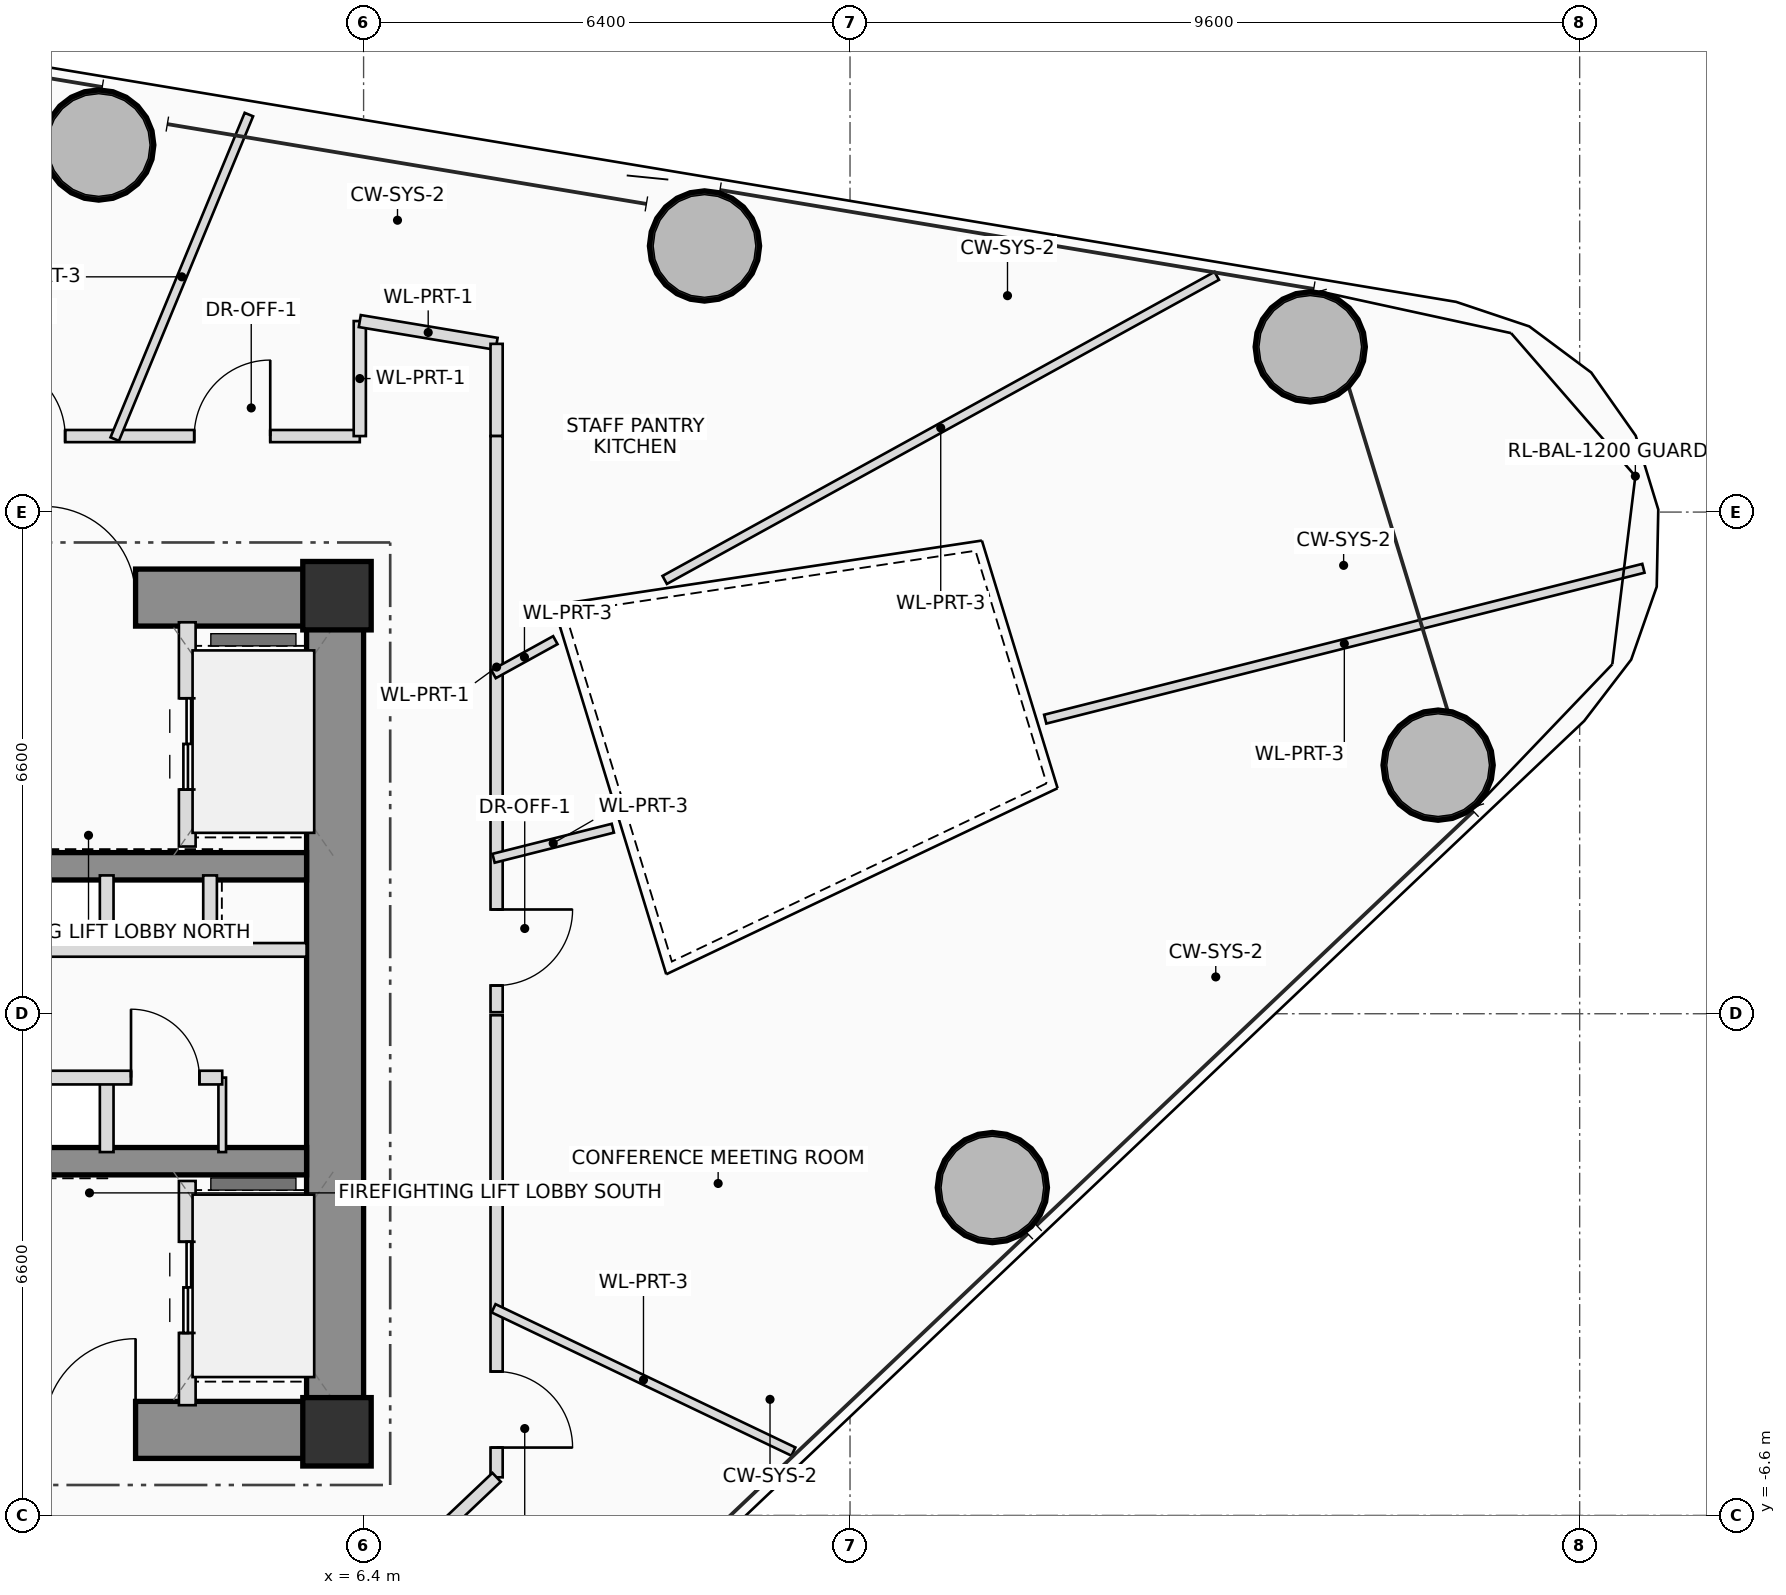
"""IFC4 building model, lengths in metres.
Left out: names, types, materials, properties, quantities, classifications, styles, units other than length and angle.
Written with IfcOpenShell. Run it as: python <this file> out.ifc"""

import sys

from ifc_helpers import new_model, si_unit, direction, frame, frame_2d, origin, origin_2d, place, context, subcontext, project, spatial, rectangle, hollow_circle, extrude, source, transform, mapped, element, fill, save


model = new_model("IFC4")
c1 = context("Model", 3, precision=1e-05, world=origin(), true_north=direction((0.0, 1.0)))
c2 = subcontext(c1, "Body", "Model", "MODEL_VIEW")
j1 = project(units=[si_unit("LENGTHUNIT", "METRE"), si_unit("PLANEANGLEUNIT", "RADIAN")], contexts=[c1])
p1 = place(None, origin())
s1 = spatial("IfcSite", under=j1, at=p1, CompositionType="ELEMENT")
p2 = place(p1, origin())
s2 = spatial("IfcBuilding", under=s1, at=p2, CompositionType="ELEMENT")
p3 = place(p2, frame((0.0, 0.0, 116.15)))
s3 = spatial("IfcBuildingStorey", under=s2, at=p3, CompositionType="ELEMENT", Elevation=116.15)
m1 = source(origin(), c2, "Body", "SweptSolid", [
    extrude(rectangle(XDim=0.9, YDim=0.9, at=origin_2d()), origin(), (0.0, 0.0, 1.0), 3.75),
])
for number, where, z_axis, x_axis in (
    (1, (6.05, -5.5, 0.0), (0.0, 0.0, 1.0), (1.0, 0.0, 0.0)),
    (2, (6.05, 5.5, 0.0), (0.0, 0.0, 1.0), (1.0, 0.0, 0.0)),
):
    element("IfcColumn", number, at=place(p3, frame(where, z_axis=z_axis, x_axis=x_axis)), inside=s3, PredefinedType="COLUMN", context=c2, shape_type="MappedRepresentation", body=[
        mapped(m1, transform((0.0, 0.0, 0.0), scale=1.0)),
    ])
p4 = place(p3, frame((-6.4, 5.475, 0.0), z_axis=(0.0, 0.0, 1.0), x_axis=(1.0, 0.0, 0.0)))
e3 = element("IfcWall", 3, at=p4, inside=s3, PredefinedType="SHEAR", context=c2, shape_type="SweptSolid", body=[
    extrude(rectangle(XDim=12.8, YDim=0.75, at=frame_2d((6.4, 0.0))), origin(), (0.0, 0.0, 1.0), 3.75),
])
p5 = place(p4, frame((8.6, 0.0, 0.0)))
e4 = element("IfcOpeningElement", 4, at=p5, cuts=e3, PredefinedType="OPENING", context=c2, shape_type="SweptSolid", body=[
    extrude(rectangle(XDim=1.2, YDim=2.2, at=frame_2d((0.6, 1.1))), frame((0.0, 0.385, 0.0), z_axis=(0.0, -1.0, 0.0), x_axis=(1.0, 0.0, 0.0)), (0.0, 0.0, 1.0), 0.77),
])
p6 = place(p3, frame((-6.4, -5.475, 0.0), z_axis=(0.0, 0.0, 1.0), x_axis=(1.0, 0.0, 0.0)))
e5 = element("IfcWall", 5, at=p6, inside=s3, PredefinedType="SHEAR", context=c2, shape_type="SweptSolid", body=[
    extrude(rectangle(XDim=12.8, YDim=0.75, at=frame_2d((6.4, 0.0))), origin(), (0.0, 0.0, 1.0), 3.75),
])
p7 = place(p6, frame((8.6, 0.0, 0.0)))
e6 = element("IfcOpeningElement", 6, at=p7, cuts=e5, PredefinedType="OPENING", context=c2, shape_type="SweptSolid", body=[
    extrude(rectangle(XDim=1.2, YDim=2.2, at=frame_2d((0.6, 1.1))), frame((0.0, 0.385, 0.0), z_axis=(0.0, -1.0, 0.0), x_axis=(1.0, 0.0, 0.0)), (0.0, 0.0, 1.0), 0.77),
])
p8 = place(p3, frame((6.025, -5.1, 0.0), z_axis=(0.0, 0.0, 1.0), x_axis=(0.0, 1.0, 0.0)))
e7 = element("IfcWall", 7, at=p8, inside=s3, PredefinedType="SHEAR", context=c2, shape_type="SweptSolid", body=[
    extrude(rectangle(XDim=10.2, YDim=0.75, at=frame_2d((5.1, 0.0))), origin(), (0.0, 0.0, 1.0), 3.75),
])
for number, where, z_axis, x_axis in (
    (8, (-5.65, 1.94, 0.0), (0.0, 0.0, 1.0), (1.0, 0.0, 0.0)),
    (9, (-5.65, -1.94, 0.0), (0.0, 0.0, 1.0), (1.0, 0.0, 0.0)),
):
    element("IfcWall", number, at=place(p3, frame(where, z_axis=z_axis, x_axis=x_axis)), inside=s3, PredefinedType="SHEAR", context=c2, shape_type="SweptSolid", body=[
        extrude(rectangle(XDim=11.3, YDim=0.36, at=frame_2d((5.65, 0.0))), origin(), (0.0, 0.0, 1.0), 3.75),
    ])
m2 = source(origin(), c2, "Body", "SweptSolid", [
    extrude(hollow_circle(Radius=0.725, WallThickness=0.05, at=origin_2d()), origin(), (0.0, 0.0, 1.0), 3.75),
])
for number, where, z_axis, x_axis in (
    (10, (14.673, -2.287, 0.0), (0.0, 0.0, 1.0), (1.0, 0.0, 0.0)),
    (11, (20.538, 3.271, 0.0), (0.0, 0.0, 1.0), (1.0, 0.0, 0.0)),
    (12, (18.855, 8.773, 0.0), (0.0, 0.0, 1.0), (1.0, 0.0, 0.0)),
    (13, (10.885, 10.101, 0.0), (0.0, 0.0, 1.0), (1.0, 0.0, 0.0)),
    (14, (2.915, 11.429, 0.0), (0.0, 0.0, 1.0), (1.0, 0.0, 0.0)),
):
    element("IfcColumn", number, at=place(p3, frame(where, z_axis=z_axis, x_axis=x_axis)), inside=s3, PredefinedType="COLUMN", context=c2, shape_type="MappedRepresentation", body=[
        mapped(m2, transform((0.0, 0.0, 0.0), scale=1.0)),
    ])
p9 = place(p3, frame((4.08, 2.2, 0.0), z_axis=(0.0, 0.0, 1.0), x_axis=(0.0, 1.0, 0.0)))
e15 = element("IfcWall", 15, at=p9, inside=s3, PredefinedType="PLUMBINGWALL", context=c2, shape_type="SweptSolid", body=[
    extrude(rectangle(XDim=2.95, YDim=0.22, at=frame_2d((1.475, 0.0))), origin(), (0.0, 0.0, 1.0), 3.51),
])
p10 = place(p9, frame((0.75, 0.0, 0.0)))
e16 = element("IfcOpeningElement", 16, at=p10, cuts=e15, PredefinedType="OPENING", context=c2, shape_type="SweptSolid", body=[
    extrude(rectangle(XDim=1.2, YDim=2.25, at=frame_2d((0.6, 1.125))), frame((0.0, 0.12, 0.0), z_axis=(0.0, -1.0, 0.0), x_axis=(1.0, 0.0, 0.0)), (0.0, 0.0, 1.0), 0.24),
])
p11 = place(p3, frame((4.08, -5.15, 0.0), z_axis=(0.0, 0.0, 1.0), x_axis=(0.0, 1.0, 0.0)))
e17 = element("IfcWall", 17, at=p11, inside=s3, PredefinedType="PLUMBINGWALL", context=c2, shape_type="SweptSolid", body=[
    extrude(rectangle(XDim=2.95, YDim=0.22, at=frame_2d((1.475, 0.0))), origin(), (0.0, 0.0, 1.0), 3.51),
])
p12 = place(p11, frame((0.95, 0.0, 0.0)))
e18 = element("IfcOpeningElement", 18, at=p12, cuts=e17, PredefinedType="OPENING", context=c2, shape_type="SweptSolid", body=[
    extrude(rectangle(XDim=1.2, YDim=2.25, at=frame_2d((0.6, 1.125))), frame((0.0, 0.12, 0.0), z_axis=(0.0, -1.0, 0.0), x_axis=(1.0, 0.0, 0.0)), (0.0, 0.0, 1.0), 0.24),
])
for number, where, z_axis, x_axis in (
    (19, (3.02, 0.84, 0.0), (0.0, 0.0, 1.0), (0.0, 1.0, 0.0)),
    (20, (4.38, 0.84, 0.0), (0.0, 0.0, 1.0), (0.0, 1.0, 0.0)),
    (21, (3.02, -1.82, 0.0), (0.0, 0.0, 1.0), (0.0, 1.0, 0.0)),
):
    element("IfcWall", number, at=place(p3, frame(where, z_axis=z_axis, x_axis=x_axis)), inside=s3, PredefinedType="PLUMBINGWALL", context=c2, shape_type="SweptSolid", body=[
        extrude(rectangle(XDim=0.98, YDim=0.18, at=frame_2d((0.49, 0.0))), origin(), (0.0, 0.0, 1.0), 3.51),
    ])
p13 = place(p3, frame((4.54, -1.82, 0.0), z_axis=(0.0, 0.0, 1.0), x_axis=(0.0, 1.0, 0.0)))
e22 = element("IfcWall", 22, at=p13, inside=s3, PredefinedType="PARTITIONING", context=c2, shape_type="SweptSolid", body=[
    extrude(rectangle(XDim=0.98, YDim=0.1, at=frame_2d((0.49, 0.0))), origin(), (0.0, 0.0, 1.0), 3.51),
])
p14 = place(p3, frame((-5.68, 0.84, 0.0), z_axis=(0.0, 0.0, 1.0), x_axis=(1.0, 0.0, 0.0)))
e23 = element("IfcWall", 23, at=p14, inside=s3, PredefinedType="PLUMBINGWALL", context=c2, shape_type="SweptSolid", body=[
    extrude(rectangle(XDim=11.33, YDim=0.18, at=frame_2d((5.665, 0.0))), origin(), (0.0, 0.0, 1.0), 3.51),
])
p15 = place(p14, frame((0.43, 0.0, 0.0)))
e24 = element("IfcOpeningElement", 24, at=p15, cuts=e23, PredefinedType="OPENING", context=c2, shape_type="SweptSolid", body=[
    extrude(rectangle(XDim=1.1, YDim=2.2, at=frame_2d((0.55, 1.1))), frame((0.0, 0.1, 0.0), z_axis=(0.0, -1.0, 0.0), x_axis=(1.0, 0.0, 0.0)), (0.0, 0.0, 1.0), 0.2),
])
p16 = place(p14, frame((2.13, 0.0, 0.0)))
e25 = element("IfcOpeningElement", 25, at=p16, cuts=e23, PredefinedType="OPENING", context=c2, shape_type="SweptSolid", body=[
    extrude(rectangle(XDim=1.1, YDim=2.2, at=frame_2d((0.55, 1.1))), frame((0.0, 0.1, 0.0), z_axis=(0.0, -1.0, 0.0), x_axis=(1.0, 0.0, 0.0)), (0.0, 0.0, 1.0), 0.2),
])
p17 = place(p3, frame((-5.68, -0.84, 0.0), z_axis=(0.0, 0.0, 1.0), x_axis=(1.0, 0.0, 0.0)))
e26 = element("IfcWall", 26, at=p17, inside=s3, PredefinedType="PLUMBINGWALL", context=c2, shape_type="SweptSolid", body=[
    extrude(rectangle(XDim=10.22, YDim=0.18, at=frame_2d((5.11, 0.0))), origin(), (0.0, 0.0, 1.0), 3.51),
])
p18 = place(p17, frame((0.43, 0.0, 0.0)))
e27 = element("IfcOpeningElement", 27, at=p18, cuts=e26, PredefinedType="OPENING", context=c2, shape_type="SweptSolid", body=[
    extrude(rectangle(XDim=1.1, YDim=2.2, at=frame_2d((0.55, 1.1))), frame((0.0, 0.1, 0.0), z_axis=(0.0, -1.0, 0.0), x_axis=(1.0, 0.0, 0.0)), (0.0, 0.0, 1.0), 0.2),
])
p19 = place(p17, frame((2.13, 0.0, 0.0)))
e28 = element("IfcOpeningElement", 28, at=p19, cuts=e26, PredefinedType="OPENING", context=c2, shape_type="SweptSolid", body=[
    extrude(rectangle(XDim=1.1, YDim=2.2, at=frame_2d((0.55, 1.1))), frame((0.0, 0.1, 0.0), z_axis=(0.0, -1.0, 0.0), x_axis=(1.0, 0.0, 0.0)), (0.0, 0.0, 1.0), 0.2),
])
p20 = place(p17, frame((9.02, 0.0, 0.0)))
e29 = element("IfcOpeningElement", 29, at=p20, cuts=e26, PredefinedType="OPENING", context=c2, shape_type="SweptSolid", body=[
    extrude(rectangle(XDim=0.9, YDim=2.05, at=frame_2d((0.45, 1.025))), frame((0.0, 0.1, 0.0), z_axis=(0.0, -1.0, 0.0), x_axis=(1.0, 0.0, 0.0)), (0.0, 0.0, 1.0), 0.2),
])
p21 = place(p3, frame((-6.35, 7.6, 0.0), z_axis=(0.0, 0.0, 1.0), x_axis=(1.0, 0.0, 0.0)))
e30 = element("IfcWall", 30, at=p21, inside=s3, PredefinedType="PARTITIONING", context=c2, shape_type="SweptSolid", body=[
    extrude(rectangle(XDim=12.7, YDim=0.16, at=frame_2d((6.35, 0.0))), origin(), (0.0, 0.0, 1.0), 2.815),
])
p22 = place(p21, frame((4.205, 0.0, 0.0)))
e31 = element("IfcOpeningElement", 31, at=p22, cuts=e30, PredefinedType="OPENING", context=c2, shape_type="SweptSolid", body=[
    extrude(rectangle(XDim=1.0, YDim=2.25, at=frame_2d((0.5, 1.125))), frame((0.0, 0.09, 0.0), z_axis=(0.0, -1.0, 0.0), x_axis=(1.0, 0.0, 0.0)), (0.0, 0.0, 1.0), 0.18),
])
p23 = place(p21, frame((7.823, 0.0, 0.0)))
e32 = element("IfcOpeningElement", 32, at=p23, cuts=e30, PredefinedType="OPENING", context=c2, shape_type="SweptSolid", body=[
    extrude(rectangle(XDim=1.0, YDim=2.25, at=frame_2d((0.5, 1.125))), frame((0.0, 0.09, 0.0), z_axis=(0.0, -1.0, 0.0), x_axis=(1.0, 0.0, 0.0)), (0.0, 0.0, 1.0), 0.18),
])
p24 = place(p21, frame((10.522, 0.0, 0.0)))
e33 = element("IfcOpeningElement", 33, at=p24, cuts=e30, PredefinedType="OPENING", context=c2, shape_type="SweptSolid", body=[
    extrude(rectangle(XDim=1.0, YDim=2.25, at=frame_2d((0.5, 1.125))), frame((0.0, 0.09, 0.0), z_axis=(0.0, -1.0, 0.0), x_axis=(1.0, 0.0, 0.0)), (0.0, 0.0, 1.0), 0.18),
])
p25 = place(p3, frame((6.35, 7.6, 0.0), z_axis=(0.0, 0.0, 1.0), x_axis=(0.0, 1.0, 0.0)))
e34 = element("IfcWall", 34, at=p25, inside=s3, PredefinedType="PARTITIONING", context=c2, shape_type="SweptSolid", body=[
    extrude(rectangle(XDim=1.513, YDim=0.16, at=frame_2d((0.756, 0.0))), origin(), (0.0, 0.0, 1.0), 3.015),
])
p26 = place(p3, frame((6.35, 9.113, 0.0), z_axis=(0.0, 0.0, 1.0), x_axis=(0.986386690349, -0.164442382317, 0.0)))
e35 = element("IfcWall", 35, at=p26, inside=s3, PredefinedType="PARTITIONING", context=c2, shape_type="SweptSolid", body=[
    extrude(rectangle(XDim=1.825, YDim=0.16, at=frame_2d((0.912, 0.0))), origin(), (0.0, 0.0, 1.0), 3.165),
])
p27 = place(p3, frame((8.15, 8.813, 0.0), z_axis=(0.0, 0.0, 1.0), x_axis=(0.0, -1.0, 0.0)))
e36 = element("IfcWall", 36, at=p27, inside=s3, PredefinedType="PARTITIONING", context=c2, shape_type="SweptSolid", body=[
    extrude(rectangle(XDim=1.213, YDim=0.16, at=frame_2d((0.606, 0.0))), origin(), (0.0, 0.0, 1.0), 2.815),
])
p28 = place(p3, frame((8.15, 7.6, 0.0), z_axis=(0.0, 0.0, 1.0), x_axis=(0.0, -1.0, 0.0)))
e37 = element("IfcWall", 37, at=p28, inside=s3, PredefinedType="PARTITIONING", context=c2, shape_type="SweptSolid", body=[
    extrude(rectangle(XDim=7.58, YDim=0.16, at=frame_2d((3.79, 0.0))), origin(), (0.0, 0.0, 1.0), 2.815),
])
p29 = place(p28, frame((6.229, 0.0, 0.0)))
e38 = element("IfcOpeningElement", 38, at=p29, cuts=e37, PredefinedType="OPENING", context=c2, shape_type="SweptSolid", body=[
    extrude(rectangle(XDim=1.0, YDim=2.25, at=frame_2d((0.5, 1.125))), frame((0.0, 0.09, 0.0), z_axis=(0.0, -1.0, 0.0), x_axis=(1.0, 0.0, 0.0)), (0.0, 0.0, 1.0), 0.18),
])
p30 = place(p3, frame((8.15, -0.02, 0.0), z_axis=(0.0, 0.0, 1.0), x_axis=(0.0, -1.0, 0.0)))
e39 = element("IfcWall", 39, at=p30, inside=s3, PredefinedType="PARTITIONING", context=c2, shape_type="SweptSolid", body=[
    extrude(rectangle(XDim=6.079, YDim=0.16, at=frame_2d((3.04, 0.0))), origin(), (0.0, 0.0, 1.0), 2.815),
])
p31 = place(p30, frame((4.688, 0.0, 0.0)))
e40 = element("IfcOpeningElement", 40, at=p31, cuts=e39, PredefinedType="OPENING", context=c2, shape_type="SweptSolid", body=[
    extrude(rectangle(XDim=1.0, YDim=2.25, at=frame_2d((0.5, 1.125))), frame((0.0, 0.09, 0.0), z_axis=(0.0, -1.0, 0.0), x_axis=(1.0, 0.0, 0.0)), (0.0, 0.0, 1.0), 0.18),
])
p32 = place(p3, frame((8.15, -6.099, 0.0), z_axis=(0.0, 0.0, 1.0), x_axis=(-0.725854359245, -0.687848420196, 0.0)))
e41 = element("IfcWall", 41, at=p32, inside=s3, PredefinedType="PARTITIONING", context=c2, shape_type="SweptSolid", body=[
    extrude(rectangle(XDim=2.479, YDim=0.16, at=frame_2d((1.24, 0.0))), origin(), (0.0, 0.0, 1.0), 2.815),
])
p33 = place(p3, frame((8.11, -3.875, 0.0), z_axis=(0.0, 0.0, 1.0), x_axis=(0.902280645173, -0.431149205433, 0.0)))
e42 = element("IfcWall", 42, at=p33, inside=s3, PredefinedType="PARTITIONING", context=c2, shape_type="SweptSolid", body=[
    extrude(rectangle(XDim=4.372, YDim=0.12, at=frame_2d((2.186, 0.0))), origin(), (0.0, 0.0, 1.0), 2.815),
])
p34 = place(p3, frame((8.11, 2.045, 0.0), z_axis=(0.0, 0.0, 1.0), x_axis=(0.969634535422, 0.244558515936, 0.0)))
e43 = element("IfcWall", 43, at=p34, inside=s3, PredefinedType="PARTITIONING", context=c2, shape_type="SweptSolid", body=[
    extrude(rectangle(XDim=1.618, YDim=0.12, at=frame_2d((0.809, 0.0))), origin(), (0.0, 0.0, 1.0), 3.175),
])
p35 = place(p3, frame((15.368, 3.875, 0.0), z_axis=(0.0, 0.0, 1.0), x_axis=(0.969639714565, 0.244537980563, 0.0)))
e44 = element("IfcWall", 44, at=p35, inside=s3, PredefinedType="PARTITIONING", context=c2, shape_type="SweptSolid", body=[
    extrude(rectangle(XDim=8.117, YDim=0.12, at=frame_2d((4.058, 0.0))), origin(), (0.0, 0.0, 1.0), 2.815),
])
p36 = place(p3, frame((8.11, 4.467, 0.0), z_axis=(0.0, 0.0, 1.0), x_axis=(0.875876836962, 0.482534730847, 0.0)))
e45 = element("IfcWall", 45, at=p36, inside=s3, PredefinedType="PARTITIONING", context=c2, shape_type="SweptSolid", body=[
    extrude(rectangle(XDim=0.928, YDim=0.12, at=frame_2d((0.464, 0.0))), origin(), (0.0, 0.0, 1.0), 3.175),
])
p37 = place(p3, frame((10.362, 5.707, 0.0), z_axis=(0.0, 0.0, 1.0), x_axis=(0.875911137712, 0.482472464326, 0.0)))
e46 = element("IfcWall", 46, at=p37, inside=s3, PredefinedType="PARTITIONING", context=c2, shape_type="SweptSolid", body=[
    extrude(rectangle(XDim=8.292, YDim=0.12, at=frame_2d((4.146, 0.0))), origin(), (0.0, 0.0, 1.0), 2.815),
])
p38 = place(p3, frame((3.125, 7.56, 0.0), z_axis=(0.0, 0.0, 1.0), x_axis=(0.382088862778, 0.924125587212, 0.0)))
e47 = element("IfcWall", 47, at=p38, inside=s3, PredefinedType="PARTITIONING", context=c2, shape_type="SweptSolid", body=[
    extrude(rectangle(XDim=4.62, YDim=0.12, at=frame_2d((2.31, 0.0))), origin(), (0.0, 0.0, 1.0), 2.815),
])
p39 = place(p5, origin())
e48 = element("IfcDoor", 48, at=p39, inside=s3, OperationType="SINGLE_SWING_LEFT", PredefinedType="DOOR", context=c2, shape_type="SweptSolid", body=[
    extrude(rectangle(XDim=1.2, YDim=2.2, at=frame_2d((0.6, 1.1))), frame((0.0, 0.025, 0.0), z_axis=(0.0, -1.0, 0.0), x_axis=(1.0, 0.0, 0.0)), (0.0, 0.0, 1.0), 0.05),
])
fill(e4, e48)
p40 = place(p7, origin())
e49 = element("IfcDoor", 49, at=p40, inside=s3, OperationType="SINGLE_SWING_RIGHT", PredefinedType="DOOR", context=c2, shape_type="SweptSolid", body=[
    extrude(rectangle(XDim=1.2, YDim=2.2, at=frame_2d((0.6, 1.1))), frame((0.0, 0.025, 0.0), z_axis=(0.0, -1.0, 0.0), x_axis=(1.0, 0.0, 0.0)), (0.0, 0.0, 1.0), 0.05),
])
fill(e6, e49)
p41 = place(p10, origin())
e50 = element("IfcDoor", 50, at=p41, inside=s3, OperationType="DOUBLE_DOOR_SLIDING", PredefinedType="DOOR", context=c2, shape_type="SweptSolid", body=[
    extrude(rectangle(XDim=1.2, YDim=2.25, at=frame_2d((0.6, 1.125))), frame((0.0, 0.025, 0.0), z_axis=(0.0, -1.0, 0.0), x_axis=(1.0, 0.0, 0.0)), (0.0, 0.0, 1.0), 0.05),
])
fill(e16, e50)
p42 = place(p12, origin())
e51 = element("IfcDoor", 51, at=p42, inside=s3, OperationType="DOUBLE_DOOR_SLIDING", PredefinedType="DOOR", context=c2, shape_type="SweptSolid", body=[
    extrude(rectangle(XDim=1.2, YDim=2.25, at=frame_2d((0.6, 1.125))), frame((0.0, 0.025, 0.0), z_axis=(0.0, -1.0, 0.0), x_axis=(1.0, 0.0, 0.0)), (0.0, 0.0, 1.0), 0.05),
])
fill(e18, e51)
p43 = place(p20, origin())
e52 = element("IfcDoor", 52, at=p43, inside=s3, OperationType="SINGLE_SWING_LEFT", PredefinedType="DOOR", context=c2, shape_type="SweptSolid", body=[
    extrude(rectangle(XDim=0.9, YDim=2.05, at=frame_2d((0.45, 1.025))), frame((0.0, 0.025, 0.0), z_axis=(0.0, -1.0, 0.0), x_axis=(1.0, 0.0, 0.0)), (0.0, 0.0, 1.0), 0.05),
])
fill(e29, e52)
p44 = place(p23, origin())
e53 = element("IfcDoor", 53, at=p44, inside=s3, OperationType="SINGLE_SWING_LEFT", PredefinedType="DOOR", context=c2, shape_type="SweptSolid", body=[
    extrude(rectangle(XDim=1.0, YDim=2.25, at=frame_2d((0.5, 1.125))), frame((0.0, 0.025, 0.0), z_axis=(0.0, -1.0, 0.0), x_axis=(1.0, 0.0, 0.0)), (0.0, 0.0, 1.0), 0.05),
])
fill(e32, e53)
p45 = place(p24, origin())
e54 = element("IfcDoor", 54, at=p45, inside=s3, OperationType="SINGLE_SWING_RIGHT", PredefinedType="DOOR", context=c2, shape_type="SweptSolid", body=[
    extrude(rectangle(XDim=1.0, YDim=2.25, at=frame_2d((0.5, 1.125))), frame((0.0, 0.025, 0.0), z_axis=(0.0, -1.0, 0.0), x_axis=(1.0, 0.0, 0.0)), (0.0, 0.0, 1.0), 0.05),
])
fill(e33, e54)
p46 = place(p29, origin())
e55 = element("IfcDoor", 55, at=p46, inside=s3, OperationType="SINGLE_SWING_LEFT", PredefinedType="DOOR", context=c2, shape_type="SweptSolid", body=[
    extrude(rectangle(XDim=1.0, YDim=2.25, at=frame_2d((0.5, 1.125))), frame((0.0, 0.025, 0.0), z_axis=(0.0, -1.0, 0.0), x_axis=(1.0, 0.0, 0.0)), (0.0, 0.0, 1.0), 0.05),
])
fill(e38, e55)
p47 = place(p31, origin())
e56 = element("IfcDoor", 56, at=p47, inside=s3, OperationType="SINGLE_SWING_RIGHT", PredefinedType="DOOR", context=c2, shape_type="SweptSolid", body=[
    extrude(rectangle(XDim=1.0, YDim=2.25, at=frame_2d((0.5, 1.125))), frame((0.0, 0.025, 0.0), z_axis=(0.0, -1.0, 0.0), x_axis=(1.0, 0.0, 0.0)), (0.0, 0.0, 1.0), 0.05),
])
fill(e40, e56)
save(model, sys.argv[1])
